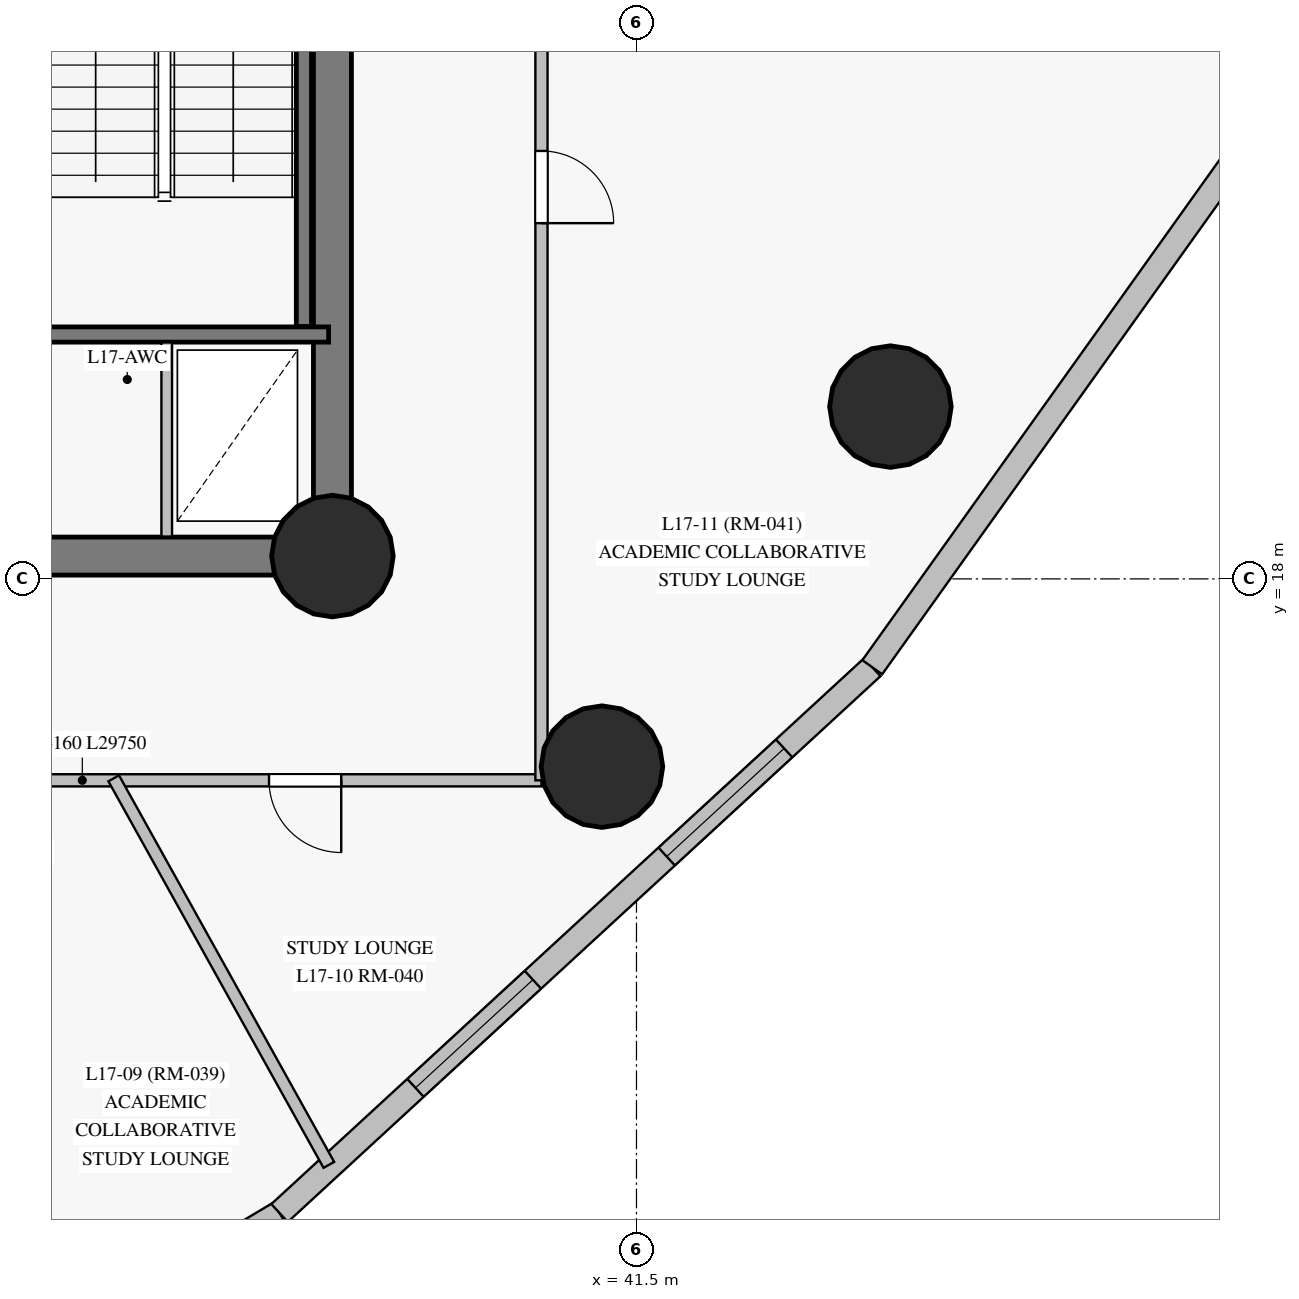
"""IFC4 building model, lengths in metres.
Left out: names, types, materials, properties, quantities, classifications, styles, units other than length and angle.
Written with IfcOpenShell. Run it as: python <this file> out.ifc"""

import sys

from ifc_helpers import new_model, si_unit, direction, frame, frame_2d, origin, origin_with_axes, origin_2d, place, context, subcontext, project, spatial, rectangle, circle, extrude, source, transform, mapped, element, fill, save


model = new_model("IFC4")
c1 = context("Model", 3, precision=1e-05, world=origin(), true_north=direction((0.0, 1.0)))
c2 = subcontext(c1, "Body", "Model", "MODEL_VIEW")
j1 = project(units=[si_unit("LENGTHUNIT", "METRE"), si_unit("PLANEANGLEUNIT", "RADIAN")], contexts=[c1])
p1 = place(None, origin())
s1 = spatial("IfcSite", under=j1, at=p1, CompositionType="ELEMENT")
p2 = place(p1, origin())
s2 = spatial("IfcBuilding", under=s1, at=p2, CompositionType="ELEMENT")
p3 = place(p2, frame((0.0, 0.0, 66.1)))
s3 = spatial("IfcBuildingStorey", under=s2, at=p3, CompositionType="ELEMENT", Elevation=66.1)
p4 = place(p3, frame((26.55, 18.3, 0.0), z_axis=(0.0, 0.0, 1.0), x_axis=(1.0, 0.0, 0.0)))
e1 = element("IfcWall", 1, at=p4, inside=s3, PredefinedType="SHEAR", context=c2, shape_type="SweptSolid", body=[
    extrude(rectangle(XDim=10.95, YDim=0.5, at=frame_2d((5.475, 0.0))), origin(), (0.0, 0.0, 1.0), 3.35),
])
p5 = place(p4, frame((4.55, 0.0, 0.0)))
e2 = element("IfcOpeningElement", 2, at=p5, cuts=e1, PredefinedType="OPENING", context=c2, shape_type="SweptSolid", body=[
    extrude(rectangle(XDim=1.4, YDim=2.2, at=frame_2d((0.7, 1.1))), frame((0.0, 0.26, 0.0), z_axis=(0.0, -1.0, 0.0), x_axis=(1.0, 0.0, 0.0)), (0.0, 0.0, 1.0), 0.52),
])
p6 = place(p3, frame((37.5, 18.3, 0.0), z_axis=(0.0, 0.0, 1.0), x_axis=(0.0, 1.0, 0.0)))
e3 = element("IfcWall", 3, at=p6, inside=s3, PredefinedType="SHEAR", context=c2, shape_type="SweptSolid", body=[
    extrude(rectangle(XDim=16.4, YDim=0.5, at=frame_2d((8.2, 0.0))), origin(), (0.0, 0.0, 1.0), 3.35),
])
p7 = place(p6, frame((14.06, 0.0, 0.0)))
e4 = element("IfcOpeningElement", 4, at=p7, cuts=e3, PredefinedType="OPENING", context=c2, shape_type="SweptSolid", body=[
    extrude(rectangle(XDim=1.2, YDim=2.15, at=frame_2d((0.6, 1.075))), frame((0.0, 0.26, 0.0), z_axis=(0.0, -1.0, 0.0), x_axis=(1.0, 0.0, 0.0)), (0.0, 0.0, 1.0), 0.52),
])
m1 = source(origin_with_axes(), c2, "Body", "SweptSolid", [
    extrude(circle(Radius=0.8, at=origin_2d()), origin(), (0.0, 0.0, 1.0), 3.6),
])
for number, where, z_axis, x_axis in (
    (5, (37.5, 18.3, 0.0), (0.0, 0.0, 1.0), (1.0, 0.0, 0.0)),
    (6, (44.841, 20.267, 0.0), (0.0, 0.0, 1.0), (1.0, 0.0, 0.0)),
    (7, (41.046, 15.53, 0.0), (0.0, 0.0, 1.0), (1.0, 0.0, 0.0)),
):
    element("IfcColumn", number, at=place(p3, frame(where, z_axis=z_axis, x_axis=x_axis)), inside=s3, PredefinedType="COLUMN", context=c2, shape_type="MappedRepresentation", body=[
        mapped(m1, transform((0.0, 0.0, 0.0), scale=1.0)),
    ])
p8 = place(p3, frame((23.71, 1.85, 0.0), z_axis=(0.0, 0.0, 1.0), x_axis=(0.858916766564, 0.512115209806, 0.0)))
e8 = element("IfcWall", 8, at=p8, inside=s3, PredefinedType="SOLIDWALL", context=c2, shape_type="SweptSolid", body=[
    extrude(rectangle(XDim=15.245, YDim=0.32, at=frame_2d((7.623, 0.0))), origin(), (0.0, 0.0, 1.0), 3.35),
])
p9 = place(p8, frame((0.926, 0.0, 0.85)))
e9 = element("IfcOpeningElement", 9, at=p9, cuts=e8, PredefinedType="OPENING", context=c2, shape_type="SweptSolid", body=[
    extrude(rectangle(XDim=2.1, YDim=1.95, at=frame_2d((1.05, 0.975))), frame((0.0, 0.17, 0.0), z_axis=(0.0, -1.0, 0.0), x_axis=(1.0, 0.0, 0.0)), (0.0, 0.0, 1.0), 0.34),
])
p10 = place(p8, frame((4.712, 0.0, 0.85)))
e10 = element("IfcOpeningElement", 10, at=p10, cuts=e8, PredefinedType="OPENING", context=c2, shape_type="SweptSolid", body=[
    extrude(rectangle(XDim=2.1, YDim=1.95, at=frame_2d((1.05, 0.975))), frame((0.0, 0.17, 0.0), z_axis=(0.0, -1.0, 0.0), x_axis=(1.0, 0.0, 0.0)), (0.0, 0.0, 1.0), 0.34),
])
p11 = place(p8, frame((8.631, 0.0, 0.85)))
e11 = element("IfcOpeningElement", 11, at=p11, cuts=e8, PredefinedType="OPENING", context=c2, shape_type="SweptSolid", body=[
    extrude(rectangle(XDim=2.1, YDim=1.95, at=frame_2d((1.05, 0.975))), frame((0.0, 0.17, 0.0), z_axis=(0.0, -1.0, 0.0), x_axis=(1.0, 0.0, 0.0)), (0.0, 0.0, 1.0), 0.34),
])
p12 = place(p8, frame((12.087, 0.0, 0.85)))
e12 = element("IfcOpeningElement", 12, at=p12, cuts=e8, PredefinedType="OPENING", context=c2, shape_type="SweptSolid", body=[
    extrude(rectangle(XDim=2.1, YDim=1.95, at=frame_2d((1.05, 0.975))), frame((0.0, 0.17, 0.0), z_axis=(0.0, -1.0, 0.0), x_axis=(1.0, 0.0, 0.0)), (0.0, 0.0, 1.0), 0.34),
])
p13 = place(p3, frame((36.804, 9.657, 0.0), z_axis=(0.0, 0.0, 1.0), x_axis=(0.735619702355, 0.677394754562, 0.0)))
e13 = element("IfcWall", 13, at=p13, inside=s3, PredefinedType="SOLIDWALL", context=c2, shape_type="SweptSolid", body=[
    extrude(rectangle(XDim=10.6, YDim=0.32, at=frame_2d((5.3, 0.0))), origin(), (0.0, 0.0, 1.0), 3.35),
])
p14 = place(p13, frame((2.431, 0.0, 0.85)))
e14 = element("IfcOpeningElement", 14, at=p14, cuts=e13, PredefinedType="OPENING", context=c2, shape_type="SweptSolid", body=[
    extrude(rectangle(XDim=2.1, YDim=1.95, at=frame_2d((1.05, 0.975))), frame((0.0, 0.17, 0.0), z_axis=(0.0, -1.0, 0.0), x_axis=(1.0, 0.0, 0.0)), (0.0, 0.0, 1.0), 0.34),
])
p15 = place(p13, frame((6.924, 0.0, 0.85)))
e15 = element("IfcOpeningElement", 15, at=p15, cuts=e13, PredefinedType="OPENING", context=c2, shape_type="SweptSolid", body=[
    extrude(rectangle(XDim=2.1, YDim=1.95, at=frame_2d((1.05, 0.975))), frame((0.0, 0.17, 0.0), z_axis=(0.0, -1.0, 0.0), x_axis=(1.0, 0.0, 0.0)), (0.0, 0.0, 1.0), 0.34),
])
p16 = place(p3, frame((44.602, 16.838, 0.0), z_axis=(0.0, 0.0, 1.0), x_axis=(0.581067336178, 0.813855485223, 0.0)))
e16 = element("IfcWall", 16, at=p16, inside=s3, PredefinedType="SOLIDWALL", context=c2, shape_type="SweptSolid", body=[
    extrude(rectangle(XDim=10.003, YDim=0.32, at=frame_2d((5.001, 0.0))), origin(), (0.0, 0.0, 1.0), 3.35),
])
p17 = place(p3, frame((37.125, 21.32, 0.0), z_axis=(0.0, 0.0, 1.0), x_axis=(0.0, 1.0, 0.0)))
e17 = element("IfcWall", 17, at=p17, inside=s3, PredefinedType="SHEAR", context=c2, shape_type="SweptSolid", body=[
    extrude(rectangle(XDim=7.5, YDim=0.2, at=frame_2d((3.75, 0.0))), origin(), (0.0, 0.0, 1.0), 3.35),
])
p18 = place(p3, frame((33.455, 21.215, 0.0), z_axis=(0.0, 0.0, 1.0), x_axis=(1.0, 0.0, 0.0)))
e18 = element("IfcWall", 18, at=p18, inside=s3, PredefinedType="SHEAR", context=c2, shape_type="SweptSolid", body=[
    extrude(rectangle(XDim=3.995, YDim=0.2, at=frame_2d((1.998, 0.0))), origin(), (0.0, 0.0, 1.0), 3.35),
])
p19 = place(p3, frame((40.25, 15.35, 0.0), z_axis=(0.0, 0.0, 1.0), x_axis=(-1.0, 0.0, 0.0)))
e19 = element("IfcWall", 19, at=p19, inside=s3, PredefinedType="PARTITIONING", context=c2, shape_type="SweptSolid", body=[
    extrude(rectangle(XDim=29.75, YDim=0.16, at=frame_2d((14.875, 0.0))), origin(), (0.0, 0.0, 1.0), 2.7),
])
p20 = place(p19, frame((26.11, 0.0, 0.0)))
e20 = element("IfcOpeningElement", 20, at=p20, cuts=e19, PredefinedType="OPENING", context=c2, shape_type="SweptSolid", body=[
    extrude(rectangle(XDim=0.96, YDim=2.15, at=frame_2d((0.48, 1.075))), frame((0.0, 0.09, 0.0), z_axis=(0.0, -1.0, 0.0), x_axis=(1.0, 0.0, 0.0)), (0.0, 0.0, 1.0), 0.18),
])
p21 = place(p19, frame((21.837, 0.0, 0.0)))
e21 = element("IfcOpeningElement", 21, at=p21, cuts=e19, PredefinedType="OPENING", context=c2, shape_type="SweptSolid", body=[
    extrude(rectangle(XDim=0.95, YDim=2.15, at=frame_2d((0.475, 1.075))), frame((0.0, 0.09, 0.0), z_axis=(0.0, -1.0, 0.0), x_axis=(1.0, 0.0, 0.0)), (0.0, 0.0, 1.0), 0.18),
])
p22 = place(p19, frame((17.716, 0.0, 0.0)))
e22 = element("IfcOpeningElement", 22, at=p22, cuts=e19, PredefinedType="OPENING", context=c2, shape_type="SweptSolid", body=[
    extrude(rectangle(XDim=0.95, YDim=2.15, at=frame_2d((0.475, 1.075))), frame((0.0, 0.09, 0.0), z_axis=(0.0, -1.0, 0.0), x_axis=(1.0, 0.0, 0.0)), (0.0, 0.0, 1.0), 0.18),
])
p23 = place(p19, frame((15.589, 0.0, 0.0)))
e23 = element("IfcOpeningElement", 23, at=p23, cuts=e19, PredefinedType="OPENING", context=c2, shape_type="SweptSolid", body=[
    extrude(rectangle(XDim=0.95, YDim=2.15, at=frame_2d((0.475, 1.075))), frame((0.0, 0.09, 0.0), z_axis=(0.0, -1.0, 0.0), x_axis=(1.0, 0.0, 0.0)), (0.0, 0.0, 1.0), 0.18),
])
p24 = place(p19, frame((12.96, 0.0, 0.0)))
e24 = element("IfcOpeningElement", 24, at=p24, cuts=e19, PredefinedType="OPENING", context=c2, shape_type="SweptSolid", body=[
    extrude(rectangle(XDim=0.96, YDim=2.15, at=frame_2d((0.48, 1.075))), frame((0.0, 0.09, 0.0), z_axis=(0.0, -1.0, 0.0), x_axis=(1.0, 0.0, 0.0)), (0.0, 0.0, 1.0), 0.18),
])
p25 = place(p19, frame((11.281, 0.0, 0.0)))
e25 = element("IfcOpeningElement", 25, at=p25, cuts=e19, PredefinedType="OPENING", context=c2, shape_type="SweptSolid", body=[
    extrude(rectangle(XDim=0.95, YDim=2.15, at=frame_2d((0.475, 1.075))), frame((0.0, 0.09, 0.0), z_axis=(0.0, -1.0, 0.0), x_axis=(1.0, 0.0, 0.0)), (0.0, 0.0, 1.0), 0.18),
])
p26 = place(p19, frame((9.601, 0.0, 0.0)))
e26 = element("IfcOpeningElement", 26, at=p26, cuts=e19, PredefinedType="OPENING", context=c2, shape_type="SweptSolid", body=[
    extrude(rectangle(XDim=0.96, YDim=2.15, at=frame_2d((0.48, 1.075))), frame((0.0, 0.09, 0.0), z_axis=(0.0, -1.0, 0.0), x_axis=(1.0, 0.0, 0.0)), (0.0, 0.0, 1.0), 0.18),
])
p27 = place(p19, frame((8.498, 0.0, 0.0)))
e27 = element("IfcOpeningElement", 27, at=p27, cuts=e19, PredefinedType="OPENING", context=c2, shape_type="SweptSolid", body=[
    extrude(rectangle(XDim=0.95, YDim=2.15, at=frame_2d((0.475, 1.075))), frame((0.0, 0.09, 0.0), z_axis=(0.0, -1.0, 0.0), x_axis=(1.0, 0.0, 0.0)), (0.0, 0.0, 1.0), 0.18),
])
p28 = place(p19, frame((2.634, 0.0, 0.0)))
e28 = element("IfcOpeningElement", 28, at=p28, cuts=e19, PredefinedType="OPENING", context=c2, shape_type="SweptSolid", body=[
    extrude(rectangle(XDim=0.95, YDim=2.15, at=frame_2d((0.475, 1.075))), frame((0.0, 0.09, 0.0), z_axis=(0.0, -1.0, 0.0), x_axis=(1.0, 0.0, 0.0)), (0.0, 0.0, 1.0), 0.18),
])
p29 = place(p3, frame((40.25, 37.65, 0.0), z_axis=(0.0, 0.0, 1.0), x_axis=(0.0, -1.0, 0.0)))
e29 = element("IfcWall", 29, at=p29, inside=s3, PredefinedType="PARTITIONING", context=c2, shape_type="SweptSolid", body=[
    extrude(rectangle(XDim=22.3, YDim=0.16, at=frame_2d((11.15, 0.0))), origin(), (0.0, 0.0, 1.0), 2.75),
])
p30 = place(p29, frame((14.02, 0.0, 0.0)))
e30 = element("IfcOpeningElement", 30, at=p30, cuts=e29, PredefinedType="OPENING", context=c2, shape_type="SweptSolid", body=[
    extrude(rectangle(XDim=0.95, YDim=2.15, at=frame_2d((0.475, 1.075))), frame((0.0, 0.09, 0.0), z_axis=(0.0, -1.0, 0.0), x_axis=(1.0, 0.0, 0.0)), (0.0, 0.0, 1.0), 0.18),
])
p31 = place(p29, frame((10.675, 0.0, 0.0)))
e31 = element("IfcOpeningElement", 31, at=p31, cuts=e29, PredefinedType="OPENING", context=c2, shape_type="SweptSolid", body=[
    extrude(rectangle(XDim=0.96, YDim=2.15, at=frame_2d((0.48, 1.075))), frame((0.0, 0.09, 0.0), z_axis=(0.0, -1.0, 0.0), x_axis=(1.0, 0.0, 0.0)), (0.0, 0.0, 1.0), 0.18),
])
p32 = place(p29, frame((7.04, 0.0, 0.0)))
e32 = element("IfcOpeningElement", 32, at=p32, cuts=e29, PredefinedType="OPENING", context=c2, shape_type="SweptSolid", body=[
    extrude(rectangle(XDim=0.95, YDim=2.15, at=frame_2d((0.475, 1.075))), frame((0.0, 0.09, 0.0), z_axis=(0.0, -1.0, 0.0), x_axis=(1.0, 0.0, 0.0)), (0.0, 0.0, 1.0), 0.18),
])
p33 = place(p29, frame((3.01, 0.0, 0.0)))
e33 = element("IfcOpeningElement", 33, at=p33, cuts=e29, PredefinedType="OPENING", context=c2, shape_type="SweptSolid", body=[
    extrude(rectangle(XDim=0.96, YDim=2.15, at=frame_2d((0.48, 1.075))), frame((0.0, 0.09, 0.0), z_axis=(0.0, -1.0, 0.0), x_axis=(1.0, 0.0, 0.0)), (0.0, 0.0, 1.0), 0.18),
])
p34 = place(p29, frame((1.651, 0.0, 0.0)))
e34 = element("IfcOpeningElement", 34, at=p34, cuts=e29, PredefinedType="OPENING", context=c2, shape_type="SweptSolid", body=[
    extrude(rectangle(XDim=0.96, YDim=2.15, at=frame_2d((0.48, 1.075))), frame((0.0, 0.09, 0.0), z_axis=(0.0, -1.0, 0.0), x_axis=(1.0, 0.0, 0.0)), (0.0, 0.0, 1.0), 0.18),
])
p35 = place(p3, frame((34.623, 15.376, 0.0), z_axis=(0.0, 0.0, 1.0), x_axis=(0.486326647137, -0.873777083863, 0.0)))
e35 = element("IfcWall", 35, at=p35, inside=s3, PredefinedType="PARTITIONING", context=c2, shape_type="SweptSolid", body=[
    extrude(rectangle(XDim=5.82, YDim=0.16, at=frame_2d((2.91, 0.0))), origin(), (0.0, 0.0, 1.0), 3.35),
])
p36 = place(p3, frame((35.32, 18.557, 0.0), z_axis=(0.0, 0.0, 1.0), x_axis=(0.0, 1.0, 0.0)))
e36 = element("IfcWall", 36, at=p36, inside=s3, PredefinedType="PARTITIONING", context=c2, shape_type="SweptSolid", body=[
    extrude(rectangle(XDim=2.553, YDim=0.14, at=frame_2d((1.277, 0.0))), origin(), (0.0, 0.0, 1.0), 3.35),
])
m2 = source(origin_with_axes(), c2, "Body", "SweptSolid", [
    extrude(rectangle(XDim=2.1, YDim=1.95, at=frame_2d((1.05, 0.975))), frame((0.0, 0.03, 0.0), z_axis=(0.0, -1.0, 0.0), x_axis=(1.0, 0.0, 0.0)), (0.0, 0.0, 1.0), 0.06),
])
p37 = place(p14, origin())
e37 = element("IfcWindow", 37, at=p37, inside=s3, PartitioningType="SINGLE_PANEL", PredefinedType="WINDOW", context=c2, shape_type="MappedRepresentation", body=[
    mapped(m2, transform((0.0, 0.0, 0.0), scale=1.0)),
])
fill(e14, e37)
p38 = place(p15, origin())
e38 = element("IfcWindow", 38, at=p38, inside=s3, PartitioningType="SINGLE_PANEL", PredefinedType="WINDOW", context=c2, shape_type="MappedRepresentation", body=[
    mapped(m2, transform((0.0, 0.0, 0.0), scale=1.0)),
])
fill(e15, e38)
m3 = source(origin_with_axes(), c2, "Body", "SweptSolid", [
    extrude(rectangle(XDim=0.95, YDim=2.15, at=frame_2d((0.475, 1.075))), frame((0.0, 0.025, 0.0), z_axis=(0.0, -1.0, 0.0), x_axis=(1.0, 0.0, 0.0)), (0.0, 0.0, 1.0), 0.05),
])
p39 = place(p28, origin())
e39 = element("IfcDoor", 39, at=p39, inside=s3, OperationType="SINGLE_SWING_LEFT", PredefinedType="DOOR", context=c2, shape_type="MappedRepresentation", body=[
    mapped(m3, transform((0.0, 0.0, 0.0), scale=1.0)),
])
fill(e28, e39)
p40 = place(p30, origin())
e40 = element("IfcDoor", 40, at=p40, inside=s3, OperationType="SINGLE_SWING_RIGHT", PredefinedType="DOOR", context=c2, shape_type="MappedRepresentation", body=[
    mapped(m3, transform((0.0, 0.0, 0.0), scale=1.0)),
])
fill(e30, e40)
save(model, sys.argv[1])
